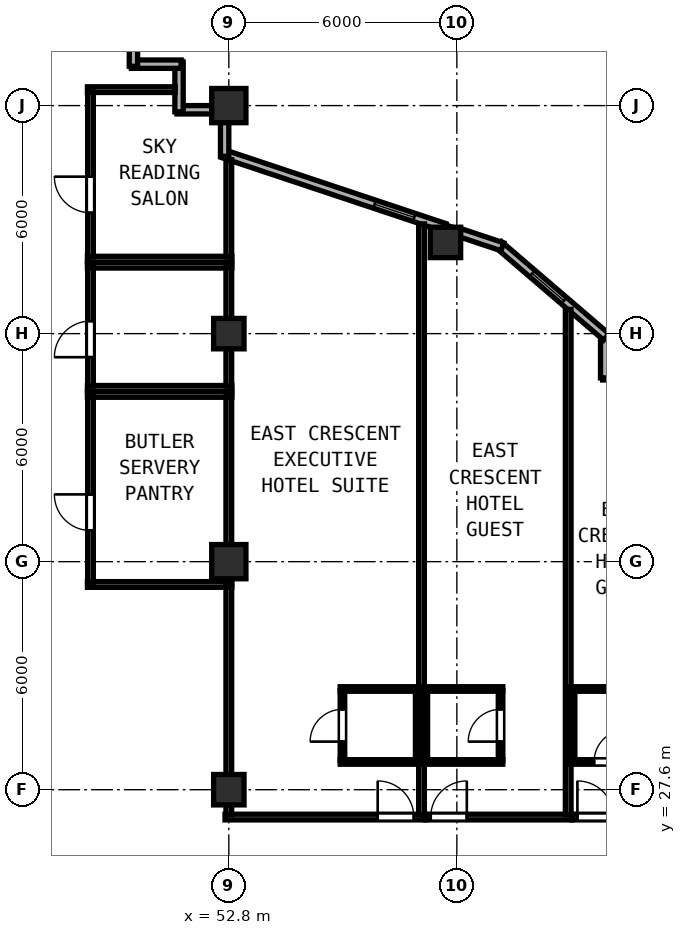
"""IFC4 building model, lengths in metres.
Left out: names, types, materials, properties, quantities, classifications, styles, units other than length and angle.
Written with IfcOpenShell. Run it as: python <this file> out.ifc"""

import sys

from ifc_helpers import new_model, si_unit, direction, frame, frame_2d, origin, origin_2d, place, context, subcontext, project, spatial, rectangle, hollow_rectangle, extrude, element, fill, save


model = new_model("IFC4")
c1 = context("Model", 3, precision=1e-05, world=origin(), true_north=direction((0.0, 1.0)))
c2 = subcontext(c1, "Body", "Model", "MODEL_VIEW")
j1 = project(units=[si_unit("LENGTHUNIT", "METRE"), si_unit("PLANEANGLEUNIT", "RADIAN")], contexts=[c1])
p1 = place(None, origin())
s1 = spatial("IfcSite", under=j1, at=p1, CompositionType="ELEMENT")
p2 = place(p1, origin())
s2 = spatial("IfcBuilding", under=s1, at=p2, CompositionType="ELEMENT")
p3 = place(p2, frame((0.0, 0.0, 215.4)))
s3 = spatial("IfcBuildingStorey", under=s2, at=p3, CompositionType="ELEMENT", Elevation=215.4)
for number, where, z_axis, x_axis in (
    (1, (52.8, 33.6, 0.0), (0.0, 0.0, 1.0), (1.0, 0.0, 0.0)),
    (2, (52.8, 45.6, 0.0), (0.0, 0.0, 1.0), (1.0, 0.0, 0.0)),
):
    element("IfcColumn", number, at=place(p3, frame(where, z_axis=z_axis, x_axis=x_axis)), inside=s3, PredefinedType="COLUMN", context=c2, shape_type="SweptSolid", body=[
        extrude(hollow_rectangle(XDim=0.9, YDim=0.9, WallThickness=0.034, at=origin_2d()), origin(), (0.0, 0.0, 1.0), 3.8),
    ])
for number, where, z_axis, x_axis in (
    (3, (52.8, 27.6, 0.0), (0.0, 0.0, 1.0), (1.0, 0.0, 0.0)),
    (4, (52.8, 39.6, 0.0), (0.0, 0.0, 1.0), (1.0, 0.0, 0.0)),
    (5, (58.5, 42.0, 0.0), (0.0, 0.0, 1.0), (1.0, 0.0, 0.0)),
):
    element("IfcColumn", number, at=place(p3, frame(where, z_axis=z_axis, x_axis=x_axis)), inside=s3, PredefinedType="COLUMN", context=c2, shape_type="SweptSolid", body=[
        extrude(hollow_rectangle(XDim=0.8, YDim=0.8, WallThickness=0.03, at=origin_2d()), origin(), (0.0, 0.0, 1.0), 3.8),
    ])
p4 = place(p3, frame((63.745, 38.49, 0.0), z_axis=(0.0, 0.0, 1.0), x_axis=(-1.0, 0.0, 0.0)))
e6 = element("IfcWall", 6, at=p4, inside=s3, PredefinedType="SOLIDWALL", context=c2, shape_type="SweptSolid", body=[
    extrude(rectangle(XDim=1.11, YDim=0.22, at=frame_2d((0.555, 0.0))), origin(), (0.0, 0.0, 1.0), 3.62),
])
p5 = place(p3, frame((62.69, 38.435, 0.0), z_axis=(0.0, 0.0, 1.0), x_axis=(0.0, 1.0, 0.0)))
e7 = element("IfcWall", 7, at=p5, inside=s3, PredefinedType="SOLIDWALL", context=c2, shape_type="SweptSolid", body=[
    extrude(rectangle(XDim=1.169, YDim=0.22, at=frame_2d((0.585, 0.0))), origin(), (0.0, 0.0, 1.0), 3.62),
])
p6 = place(p3, frame((62.732, 39.514, 0.0), z_axis=(0.0, 0.0, 1.0), x_axis=(-0.759251976569, 0.65079677018, 0.0)))
e8 = element("IfcWall", 8, at=p6, inside=s3, PredefinedType="SOLIDWALL", context=c2, shape_type="SweptSolid", body=[
    extrude(rectangle(XDim=3.726, YDim=0.22, at=frame_2d((1.863, 0.0))), origin(), (0.0, 0.0, 1.0), 3.62),
])
p7 = place(p6, frame((1.467, 0.0, 0.85)))
e9 = element("IfcOpeningElement", 9, at=p7, cuts=e8, PredefinedType="OPENING", context=c2, shape_type="SweptSolid", body=[
    extrude(rectangle(XDim=1.1, YDim=1.75, at=frame_2d((0.55, 0.875))), frame((0.0, 0.12, 0.0), z_axis=(0.0, -1.0, 0.0), x_axis=(1.0, 0.0, 0.0)), (0.0, 0.0, 1.0), 0.24),
])
p8 = place(p3, frame((59.997, 41.885, 0.0), z_axis=(0.0, 0.0, 1.0), x_axis=(-0.948662335685, 0.316290646166, 0.0)))
e10 = element("IfcWall", 10, at=p8, inside=s3, PredefinedType="SOLIDWALL", context=c2, shape_type="SweptSolid", body=[
    extrude(rectangle(XDim=1.165, YDim=0.22, at=frame_2d((0.583, 0.0))), origin(), (0.0, 0.0, 1.0), 3.62),
])
p9 = place(p3, frame((58.476, 42.392, 0.0), z_axis=(0.0, 0.0, 1.0), x_axis=(-0.948691231611, 0.316203964339, 0.0)))
e11 = element("IfcWall", 11, at=p9, inside=s3, PredefinedType="SOLIDWALL", context=c2, shape_type="SweptSolid", body=[
    extrude(rectangle(XDim=6.154, YDim=0.22, at=frame_2d((3.077, 0.0))), origin(), (0.0, 0.0, 1.0), 3.215),
])
p10 = place(p9, frame((0.84, 0.0, 0.85)))
e12 = element("IfcOpeningElement", 12, at=p10, cuts=e11, PredefinedType="OPENING", context=c2, shape_type="SweptSolid", body=[
    extrude(rectangle(XDim=1.1, YDim=1.75, at=frame_2d((0.55, 0.875))), frame((0.0, 0.12, 0.0), z_axis=(0.0, -1.0, 0.0), x_axis=(1.0, 0.0, 0.0)), (0.0, 0.0, 1.0), 0.24),
])
p11 = place(p3, frame((52.69, 44.266, 0.0), z_axis=(0.0, 0.0, 1.0), x_axis=(0.0, 1.0, 0.0)))
e13 = element("IfcWall", 13, at=p11, inside=s3, PredefinedType="SOLIDWALL", context=c2, shape_type="SweptSolid", body=[
    extrude(rectangle(XDim=0.892, YDim=0.22, at=frame_2d((0.446, 0.0))), origin(), (0.0, 0.0, 1.0), 3.215),
])
p12 = place(p3, frame((52.358, 45.49, 0.0), z_axis=(0.0, 0.0, 1.0), x_axis=(-1.0, 0.0, 0.0)))
e14 = element("IfcWall", 14, at=p12, inside=s3, PredefinedType="SOLIDWALL", context=c2, shape_type="SweptSolid", body=[
    extrude(rectangle(XDim=0.923, YDim=0.22, at=frame_2d((0.461, 0.0))), origin(), (0.0, 0.0, 1.0), 3.62),
])
p13 = place(p3, frame((51.49, 45.435, 0.0), z_axis=(0.0, 0.0, 1.0), x_axis=(0.0, 1.0, 0.0)))
e15 = element("IfcWall", 15, at=p13, inside=s3, PredefinedType="SOLIDWALL", context=c2, shape_type="SweptSolid", body=[
    extrude(rectangle(XDim=1.31, YDim=0.22, at=frame_2d((0.655, 0.0))), origin(), (0.0, 0.0, 1.0), 3.62),
])
p14 = place(p3, frame((51.545, 46.69, 0.0), z_axis=(0.0, 0.0, 1.0), x_axis=(-1.0, 0.0, 0.0)))
e16 = element("IfcWall", 16, at=p14, inside=s3, PredefinedType="SOLIDWALL", context=c2, shape_type="SweptSolid", body=[
    extrude(rectangle(XDim=1.31, YDim=0.22, at=frame_2d((0.655, 0.0))), origin(), (0.0, 0.0, 1.0), 3.62),
])
p15 = place(p3, frame((50.29, 46.635, 0.0), z_axis=(0.0, 0.0, 1.0), x_axis=(0.0, 1.0, 0.0)))
e17 = element("IfcWall", 17, at=p15, inside=s3, PredefinedType="SOLIDWALL", context=c2, shape_type="SweptSolid", body=[
    extrude(rectangle(XDim=1.535, YDim=0.22, at=frame_2d((0.768, 0.0))), origin(), (0.0, 0.0, 1.0), 3.62),
])
for number, where, z_axis, x_axis in (
    (18, (49.08, 38.0, 0.0), (0.0, 0.0, 1.0), (1.0, 0.0, 0.0)),
    (19, (49.08, 33.0, 0.0), (0.0, 0.0, 1.0), (1.0, 0.0, 0.0)),
):
    element("IfcWall", number, at=place(p3, frame(where, z_axis=z_axis, x_axis=x_axis)), inside=s3, PredefinedType="PARTITIONING", context=c2, shape_type="SweptSolid", body=[
        extrude(rectangle(XDim=3.8, YDim=0.15, at=frame_2d((1.9, 0.0))), origin(), (0.0, 0.0, 1.0), 3.62),
    ])
p16 = place(p3, frame((49.16, 33.06, 0.0), z_axis=(0.0, 0.0, 1.0), x_axis=(0.0, 1.0, 0.0)))
e20 = element("IfcWall", 20, at=p16, inside=s3, PredefinedType="PARTITIONING", context=c2, shape_type="SweptSolid", body=[
    extrude(rectangle(XDim=4.88, YDim=0.15, at=frame_2d((2.44, 0.0))), origin(), (0.0, 0.0, 1.0), 3.62),
])
p17 = place(p16, frame((1.36, 0.0, 0.0)))
e21 = element("IfcOpeningElement", 21, at=p17, cuts=e20, PredefinedType="OPENING", context=c2, shape_type="SweptSolid", body=[
    extrude(rectangle(XDim=0.95, YDim=2.12, at=frame_2d((0.475, 1.06))), frame((0.0, 0.085, 0.0), z_axis=(0.0, -1.0, 0.0), x_axis=(1.0, 0.0, 0.0)), (0.0, 0.0, 1.0), 0.17),
])
p18 = place(p3, frame((52.8, 33.06, 0.0), z_axis=(0.0, 0.0, 1.0), x_axis=(0.0, 1.0, 0.0)))
e22 = element("IfcWall", 22, at=p18, inside=s3, PredefinedType="PARTITIONING", context=c2, shape_type="SweptSolid", body=[
    extrude(rectangle(XDim=4.88, YDim=0.15, at=frame_2d((2.44, 0.0))), origin(), (0.0, 0.0, 1.0), 3.215),
])
for number, where, z_axis, x_axis in (
    (23, (49.08, 41.4, 0.0), (0.0, 0.0, 1.0), (1.0, 0.0, 0.0)),
    (24, (49.08, 38.16, 0.0), (0.0, 0.0, 1.0), (1.0, 0.0, 0.0)),
):
    element("IfcWall", number, at=place(p3, frame(where, z_axis=z_axis, x_axis=x_axis)), inside=s3, PredefinedType="PARTITIONING", context=c2, shape_type="SweptSolid", body=[
        extrude(rectangle(XDim=3.8, YDim=0.15, at=frame_2d((1.9, 0.0))), origin(), (0.0, 0.0, 1.0), 3.62),
    ])
p19 = place(p3, frame((49.16, 38.22, 0.0), z_axis=(0.0, 0.0, 1.0), x_axis=(0.0, 1.0, 0.0)))
e25 = element("IfcWall", 25, at=p19, inside=s3, PredefinedType="PARTITIONING", context=c2, shape_type="SweptSolid", body=[
    extrude(rectangle(XDim=3.12, YDim=0.15, at=frame_2d((1.56, 0.0))), origin(), (0.0, 0.0, 1.0), 3.62),
])
p20 = place(p19, frame((0.76, 0.0, 0.0)))
e26 = element("IfcOpeningElement", 26, at=p20, cuts=e25, PredefinedType="OPENING", context=c2, shape_type="SweptSolid", body=[
    extrude(rectangle(XDim=0.95, YDim=2.12, at=frame_2d((0.475, 1.06))), frame((0.0, 0.085, 0.0), z_axis=(0.0, -1.0, 0.0), x_axis=(1.0, 0.0, 0.0)), (0.0, 0.0, 1.0), 0.17),
])
p21 = place(p3, frame((52.8, 38.22, 0.0), z_axis=(0.0, 0.0, 1.0), x_axis=(0.0, 1.0, 0.0)))
e27 = element("IfcWall", 27, at=p21, inside=s3, PredefinedType="PARTITIONING", context=c2, shape_type="SweptSolid", body=[
    extrude(rectangle(XDim=3.12, YDim=0.15, at=frame_2d((1.56, 0.0))), origin(), (0.0, 0.0, 1.0), 3.215),
])
p22 = place(p3, frame((49.08, 46.02, 0.0), z_axis=(0.0, 0.0, 1.0), x_axis=(1.0, 0.0, 0.0)))
e28 = element("IfcWall", 28, at=p22, inside=s3, PredefinedType="PARTITIONING", context=c2, shape_type="SweptSolid", body=[
    extrude(rectangle(XDim=2.308, YDim=0.15, at=frame_2d((1.154, 0.0))), origin(), (0.0, 0.0, 1.0), 3.62),
])
p23 = place(p3, frame((49.08, 41.56, 0.0), z_axis=(0.0, 0.0, 1.0), x_axis=(1.0, 0.0, 0.0)))
e29 = element("IfcWall", 29, at=p23, inside=s3, PredefinedType="PARTITIONING", context=c2, shape_type="SweptSolid", body=[
    extrude(rectangle(XDim=3.8, YDim=0.15, at=frame_2d((1.9, 0.0))), origin(), (0.0, 0.0, 1.0), 3.62),
])
p24 = place(p3, frame((49.16, 41.62, 0.0), z_axis=(0.0, 0.0, 1.0), x_axis=(0.0, 1.0, 0.0)))
e30 = element("IfcWall", 30, at=p24, inside=s3, PredefinedType="PARTITIONING", context=c2, shape_type="SweptSolid", body=[
    extrude(rectangle(XDim=4.34, YDim=0.15, at=frame_2d((2.17, 0.0))), origin(), (0.0, 0.0, 1.0), 3.62),
])
p25 = place(p24, frame((1.16, 0.0, 0.0)))
e31 = element("IfcOpeningElement", 31, at=p25, cuts=e30, PredefinedType="OPENING", context=c2, shape_type="SweptSolid", body=[
    extrude(rectangle(XDim=0.95, YDim=2.12, at=frame_2d((0.475, 1.06))), frame((0.0, 0.085, 0.0), z_axis=(0.0, -1.0, 0.0), x_axis=(1.0, 0.0, 0.0)), (0.0, 0.0, 1.0), 0.17),
])
p26 = place(p3, frame((52.8, 41.62, 0.0), z_axis=(0.0, 0.0, 1.0), x_axis=(0.0, 1.0, 0.0)))
e32 = element("IfcWall", 32, at=p26, inside=s3, PredefinedType="PARTITIONING", context=c2, shape_type="SweptSolid", body=[
    extrude(rectangle(XDim=2.556, YDim=0.15, at=frame_2d((1.278, 0.0))), origin(), (0.0, 0.0, 1.0), 3.215),
])
p27 = place(p3, frame((52.7, 26.88, 0.0), z_axis=(0.0, 0.0, 1.0), x_axis=(1.0, 0.0, 0.0)))
e33 = element("IfcWall", 33, at=p27, inside=s3, PredefinedType="PARTITIONING", context=c2, shape_type="SweptSolid", body=[
    extrude(rectangle(XDim=5.27, YDim=0.15, at=frame_2d((2.635, 0.0))), origin(), (0.0, 0.0, 1.0), 3.62),
])
p28 = place(p27, frame((4.017, 0.0, 0.0)))
e34 = element("IfcOpeningElement", 34, at=p28, cuts=e33, PredefinedType="OPENING", context=c2, shape_type="SweptSolid", body=[
    extrude(rectangle(XDim=0.95, YDim=2.18, at=frame_2d((0.475, 1.09))), frame((0.0, 0.085, 0.0), z_axis=(0.0, -1.0, 0.0), x_axis=(1.0, 0.0, 0.0)), (0.0, 0.0, 1.0), 0.17),
])
p29 = place(p3, frame((52.8, 26.94, 0.0), z_axis=(0.0, 0.0, 1.0), x_axis=(0.0, 1.0, 0.0)))
e35 = element("IfcWall", 35, at=p29, inside=s3, PredefinedType="PARTITIONING", context=c2, shape_type="SweptSolid", body=[
    extrude(rectangle(XDim=6.0, YDim=0.15, at=frame_2d((3.0, 0.0))), origin(), (0.0, 0.0, 1.0), 3.215),
])
p30 = place(p3, frame((57.87, 26.94, 0.0), z_axis=(0.0, 0.0, 1.0), x_axis=(0.0, 1.0, 0.0)))
e36 = element("IfcWall", 36, at=p30, inside=s3, PredefinedType="PARTITIONING", context=c2, shape_type="SweptSolid", body=[
    extrude(rectangle(XDim=15.547, YDim=0.15, at=frame_2d((7.773, 0.0))), origin(), (0.0, 0.0, 1.0), 3.62),
])
for number, where, z_axis, x_axis in (
    (37, (55.73, 30.25, 0.0), (0.0, 0.0, 1.0), (1.0, 0.0, 0.0)),
    (38, (55.73, 28.33, 0.0), (0.0, 0.0, 1.0), (1.0, 0.0, 0.0)),
):
    element("IfcWall", number, at=place(p3, frame(where, z_axis=z_axis, x_axis=x_axis)), inside=s3, PredefinedType="PARTITIONING", context=c2, shape_type="SweptSolid", body=[
        extrude(rectangle(XDim=2.08, YDim=0.12, at=frame_2d((1.04, 0.0))), origin(), (0.0, 0.0, 1.0), 3.62),
    ])
p31 = place(p3, frame((55.79, 28.375, 0.0), z_axis=(0.0, 0.0, 1.0), x_axis=(0.0, 1.0, 0.0)))
e39 = element("IfcWall", 39, at=p31, inside=s3, PredefinedType="PARTITIONING", context=c2, shape_type="SweptSolid", body=[
    extrude(rectangle(XDim=1.83, YDim=0.12, at=frame_2d((0.915, 0.0))), origin(), (0.0, 0.0, 1.0), 3.62),
])
p32 = place(p31, frame((1.34, 0.0, 0.0), z_axis=(0.0, 0.0, 1.0), x_axis=(-1.0, 0.0, 0.0)))
e40 = element("IfcOpeningElement", 40, at=p32, cuts=e39, PredefinedType="OPENING", context=c2, shape_type="SweptSolid", body=[
    extrude(rectangle(XDim=0.85, YDim=2.1, at=frame_2d((0.425, 1.05))), frame((0.0, 0.07, 0.0), z_axis=(0.0, -1.0, 0.0), x_axis=(1.0, 0.0, 0.0)), (0.0, 0.0, 1.0), 0.14),
])
p33 = place(p3, frame((57.77, 28.375, 0.0), z_axis=(0.0, 0.0, 1.0), x_axis=(0.0, 1.0, 0.0)))
e41 = element("IfcWall", 41, at=p33, inside=s3, PredefinedType="PARTITIONING", context=c2, shape_type="SweptSolid", body=[
    extrude(rectangle(XDim=1.83, YDim=0.12, at=frame_2d((0.915, 0.0))), origin(), (0.0, 0.0, 1.0), 3.62),
])
p34 = place(p3, frame((57.972, 26.88, 0.0), z_axis=(0.0, 0.0, 1.0), x_axis=(1.0, 0.0, 0.0)))
e42 = element("IfcWall", 42, at=p34, inside=s3, PredefinedType="PARTITIONING", context=c2, shape_type="SweptSolid", body=[
    extrude(rectangle(XDim=3.858, YDim=0.15, at=frame_2d((1.929, 0.0))), origin(), (0.0, 0.0, 1.0), 3.62),
])
p35 = place(p34, frame((0.14, 0.0, 0.0)))
e43 = element("IfcOpeningElement", 43, at=p35, cuts=e42, PredefinedType="OPENING", context=c2, shape_type="SweptSolid", body=[
    extrude(rectangle(XDim=0.95, YDim=2.15, at=frame_2d((0.475, 1.075))), frame((0.0, 0.085, 0.0), z_axis=(0.0, -1.0, 0.0), x_axis=(1.0, 0.0, 0.0)), (0.0, 0.0, 1.0), 0.17),
])
p36 = place(p3, frame((61.73, 26.94, 0.0), z_axis=(0.0, 0.0, 1.0), x_axis=(0.0, 1.0, 0.0)))
e44 = element("IfcWall", 44, at=p36, inside=s3, PredefinedType="PARTITIONING", context=c2, shape_type="SweptSolid", body=[
    extrude(rectangle(XDim=13.298, YDim=0.15, at=frame_2d((6.649, 0.0))), origin(), (0.0, 0.0, 1.0), 3.62),
])
for number, where, z_axis, x_axis in (
    (45, (57.93, 30.25, 0.0), (0.0, 0.0, 1.0), (1.0, 0.0, 0.0)),
    (46, (57.93, 28.33, 0.0), (0.0, 0.0, 1.0), (1.0, 0.0, 0.0)),
):
    element("IfcWall", number, at=place(p3, frame(where, z_axis=z_axis, x_axis=x_axis)), inside=s3, PredefinedType="PARTITIONING", context=c2, shape_type="SweptSolid", body=[
        extrude(rectangle(XDim=2.08, YDim=0.12, at=frame_2d((1.04, 0.0))), origin(), (0.0, 0.0, 1.0), 3.62),
    ])
p37 = place(p3, frame((57.97, 28.375, 0.0), z_axis=(0.0, 0.0, 1.0), x_axis=(0.0, 1.0, 0.0)))
e47 = element("IfcWall", 47, at=p37, inside=s3, PredefinedType="PARTITIONING", context=c2, shape_type="SweptSolid", body=[
    extrude(rectangle(XDim=1.83, YDim=0.12, at=frame_2d((0.915, 0.0))), origin(), (0.0, 0.0, 1.0), 3.62),
])
p38 = place(p3, frame((59.95, 28.375, 0.0), z_axis=(0.0, 0.0, 1.0), x_axis=(0.0, 1.0, 0.0)))
e48 = element("IfcWall", 48, at=p38, inside=s3, PredefinedType="PARTITIONING", context=c2, shape_type="SweptSolid", body=[
    extrude(rectangle(XDim=1.83, YDim=0.12, at=frame_2d((0.915, 0.0))), origin(), (0.0, 0.0, 1.0), 3.62),
])
p39 = place(p38, frame((0.49, 0.0, 0.0)))
e49 = element("IfcOpeningElement", 49, at=p39, cuts=e48, PredefinedType="OPENING", context=c2, shape_type="SweptSolid", body=[
    extrude(rectangle(XDim=0.85, YDim=2.1, at=frame_2d((0.425, 1.05))), frame((0.0, 0.07, 0.0), z_axis=(0.0, -1.0, 0.0), x_axis=(1.0, 0.0, 0.0)), (0.0, 0.0, 1.0), 0.14),
])
p40 = place(p3, frame((61.832, 26.88, 0.0), z_axis=(0.0, 0.0, 1.0), x_axis=(1.0, 0.0, 0.0)))
e50 = element("IfcWall", 50, at=p40, inside=s3, PredefinedType="PARTITIONING", context=c2, shape_type="SweptSolid", body=[
    extrude(rectangle(XDim=2.756, YDim=0.15, at=frame_2d((1.378, 0.0))), origin(), (0.0, 0.0, 1.0), 3.62),
])
p41 = place(p40, frame((0.14, 0.0, 0.0)))
e51 = element("IfcOpeningElement", 51, at=p41, cuts=e50, PredefinedType="OPENING", context=c2, shape_type="SweptSolid", body=[
    extrude(rectangle(XDim=0.95, YDim=2.15, at=frame_2d((0.475, 1.075))), frame((0.0, 0.085, 0.0), z_axis=(0.0, -1.0, 0.0), x_axis=(1.0, 0.0, 0.0)), (0.0, 0.0, 1.0), 0.17),
])
p42 = place(p3, frame((61.79, 30.25, 0.0), z_axis=(0.0, 0.0, 1.0), x_axis=(1.0, 0.0, 0.0)))
e52 = element("IfcWall", 52, at=p42, inside=s3, PredefinedType="PARTITIONING", context=c2, shape_type="SweptSolid", body=[
    extrude(rectangle(XDim=2.095, YDim=0.12, at=frame_2d((1.047, 0.0))), origin(), (0.0, 0.0, 1.0), 3.62),
])
p43 = place(p3, frame((61.79, 28.33, 0.0), z_axis=(0.0, 0.0, 1.0), x_axis=(1.0, 0.0, 0.0)))
e53 = element("IfcWall", 53, at=p43, inside=s3, PredefinedType="PARTITIONING", context=c2, shape_type="SweptSolid", body=[
    extrude(rectangle(XDim=2.095, YDim=0.12, at=frame_2d((1.047, 0.0))), origin(), (0.0, 0.0, 1.0), 3.62),
])
p44 = place(p43, frame((0.62, 0.0, 0.0)))
e54 = element("IfcOpeningElement", 54, at=p44, cuts=e53, PredefinedType="OPENING", context=c2, shape_type="SweptSolid", body=[
    extrude(rectangle(XDim=0.85, YDim=2.1, at=frame_2d((0.425, 1.05))), frame((0.0, 0.07, 0.0), z_axis=(0.0, -1.0, 0.0), x_axis=(1.0, 0.0, 0.0)), (0.0, 0.0, 1.0), 0.14),
])
p45 = place(p3, frame((61.845, 28.375, 0.0), z_axis=(0.0, 0.0, 1.0), x_axis=(0.0, 1.0, 0.0)))
e55 = element("IfcWall", 55, at=p45, inside=s3, PredefinedType="PARTITIONING", context=c2, shape_type="SweptSolid", body=[
    extrude(rectangle(XDim=1.83, YDim=0.12, at=frame_2d((0.915, 0.0))), origin(), (0.0, 0.0, 1.0), 3.62),
])
p46 = place(p7, origin())
e56 = element("IfcWindow", 56, at=p46, inside=s3, PartitioningType="SINGLE_PANEL", PredefinedType="WINDOW", context=c2, shape_type="SweptSolid", body=[
    extrude(rectangle(XDim=1.1, YDim=1.75, at=frame_2d((0.55, 0.875))), frame((0.0, 0.03, 0.0), z_axis=(0.0, -1.0, 0.0), x_axis=(1.0, 0.0, 0.0)), (0.0, 0.0, 1.0), 0.06),
])
fill(e9, e56)
p47 = place(p10, origin())
e57 = element("IfcWindow", 57, at=p47, inside=s3, PartitioningType="SINGLE_PANEL", PredefinedType="WINDOW", context=c2, shape_type="SweptSolid", body=[
    extrude(rectangle(XDim=1.1, YDim=1.75, at=frame_2d((0.55, 0.875))), frame((0.0, 0.03, 0.0), z_axis=(0.0, -1.0, 0.0), x_axis=(1.0, 0.0, 0.0)), (0.0, 0.0, 1.0), 0.06),
])
fill(e12, e57)
p48 = place(p17, origin())
e58 = element("IfcDoor", 58, at=p48, inside=s3, OperationType="SINGLE_SWING_RIGHT", PredefinedType="DOOR", context=c2, shape_type="SweptSolid", body=[
    extrude(rectangle(XDim=0.95, YDim=2.12, at=frame_2d((0.475, 1.06))), frame((0.0, 0.025, 0.0), z_axis=(0.0, -1.0, 0.0), x_axis=(1.0, 0.0, 0.0)), (0.0, 0.0, 1.0), 0.05),
])
fill(e21, e58)
p49 = place(p20, origin())
e59 = element("IfcDoor", 59, at=p49, inside=s3, OperationType="SINGLE_SWING_LEFT", PredefinedType="DOOR", context=c2, shape_type="SweptSolid", body=[
    extrude(rectangle(XDim=0.95, YDim=2.12, at=frame_2d((0.475, 1.06))), frame((0.0, 0.025, 0.0), z_axis=(0.0, -1.0, 0.0), x_axis=(1.0, 0.0, 0.0)), (0.0, 0.0, 1.0), 0.05),
])
fill(e26, e59)
p50 = place(p25, origin())
e60 = element("IfcDoor", 60, at=p50, inside=s3, OperationType="SINGLE_SWING_RIGHT", PredefinedType="DOOR", context=c2, shape_type="SweptSolid", body=[
    extrude(rectangle(XDim=0.95, YDim=2.12, at=frame_2d((0.475, 1.06))), frame((0.0, 0.025, 0.0), z_axis=(0.0, -1.0, 0.0), x_axis=(1.0, 0.0, 0.0)), (0.0, 0.0, 1.0), 0.05),
])
fill(e31, e60)
p51 = place(p28, origin())
e61 = element("IfcDoor", 61, at=p51, inside=s3, OperationType="SINGLE_SWING_LEFT", PredefinedType="DOOR", context=c2, shape_type="SweptSolid", body=[
    extrude(rectangle(XDim=0.95, YDim=2.18, at=frame_2d((0.475, 1.09))), frame((0.0, 0.025, 0.0), z_axis=(0.0, -1.0, 0.0), x_axis=(1.0, 0.0, 0.0)), (0.0, 0.0, 1.0), 0.05),
])
fill(e34, e61)
p52 = place(p32, origin())
e62 = element("IfcDoor", 62, at=p52, inside=s3, OperationType="SINGLE_SWING_RIGHT", PredefinedType="DOOR", context=c2, shape_type="SweptSolid", body=[
    extrude(rectangle(XDim=0.85, YDim=2.1, at=frame_2d((0.425, 1.05))), frame((0.0, 0.025, 0.0), z_axis=(0.0, -1.0, 0.0), x_axis=(1.0, 0.0, 0.0)), (0.0, 0.0, 1.0), 0.05),
])
fill(e40, e62)
p53 = place(p35, origin())
e63 = element("IfcDoor", 63, at=p53, inside=s3, OperationType="SINGLE_SWING_RIGHT", PredefinedType="DOOR", context=c2, shape_type="SweptSolid", body=[
    extrude(rectangle(XDim=0.95, YDim=2.15, at=frame_2d((0.475, 1.075))), frame((0.0, 0.025, 0.0), z_axis=(0.0, -1.0, 0.0), x_axis=(1.0, 0.0, 0.0)), (0.0, 0.0, 1.0), 0.05),
])
fill(e43, e63)
p54 = place(p39, origin())
e64 = element("IfcDoor", 64, at=p54, inside=s3, OperationType="SINGLE_SWING_LEFT", PredefinedType="DOOR", context=c2, shape_type="SweptSolid", body=[
    extrude(rectangle(XDim=0.85, YDim=2.1, at=frame_2d((0.425, 1.05))), frame((0.0, 0.025, 0.0), z_axis=(0.0, -1.0, 0.0), x_axis=(1.0, 0.0, 0.0)), (0.0, 0.0, 1.0), 0.05),
])
fill(e49, e64)
p55 = place(p41, origin())
e65 = element("IfcDoor", 65, at=p55, inside=s3, OperationType="SINGLE_SWING_LEFT", PredefinedType="DOOR", context=c2, shape_type="SweptSolid", body=[
    extrude(rectangle(XDim=0.95, YDim=2.15, at=frame_2d((0.475, 1.075))), frame((0.0, 0.025, 0.0), z_axis=(0.0, -1.0, 0.0), x_axis=(1.0, 0.0, 0.0)), (0.0, 0.0, 1.0), 0.05),
])
fill(e51, e65)
p56 = place(p44, origin())
e66 = element("IfcDoor", 66, at=p56, inside=s3, OperationType="SINGLE_SWING_RIGHT", PredefinedType="DOOR", context=c2, shape_type="SweptSolid", body=[
    extrude(rectangle(XDim=0.85, YDim=2.1, at=frame_2d((0.425, 1.05))), frame((0.0, 0.025, 0.0), z_axis=(0.0, -1.0, 0.0), x_axis=(1.0, 0.0, 0.0)), (0.0, 0.0, 1.0), 0.05),
])
fill(e54, e66)
save(model, sys.argv[1])
